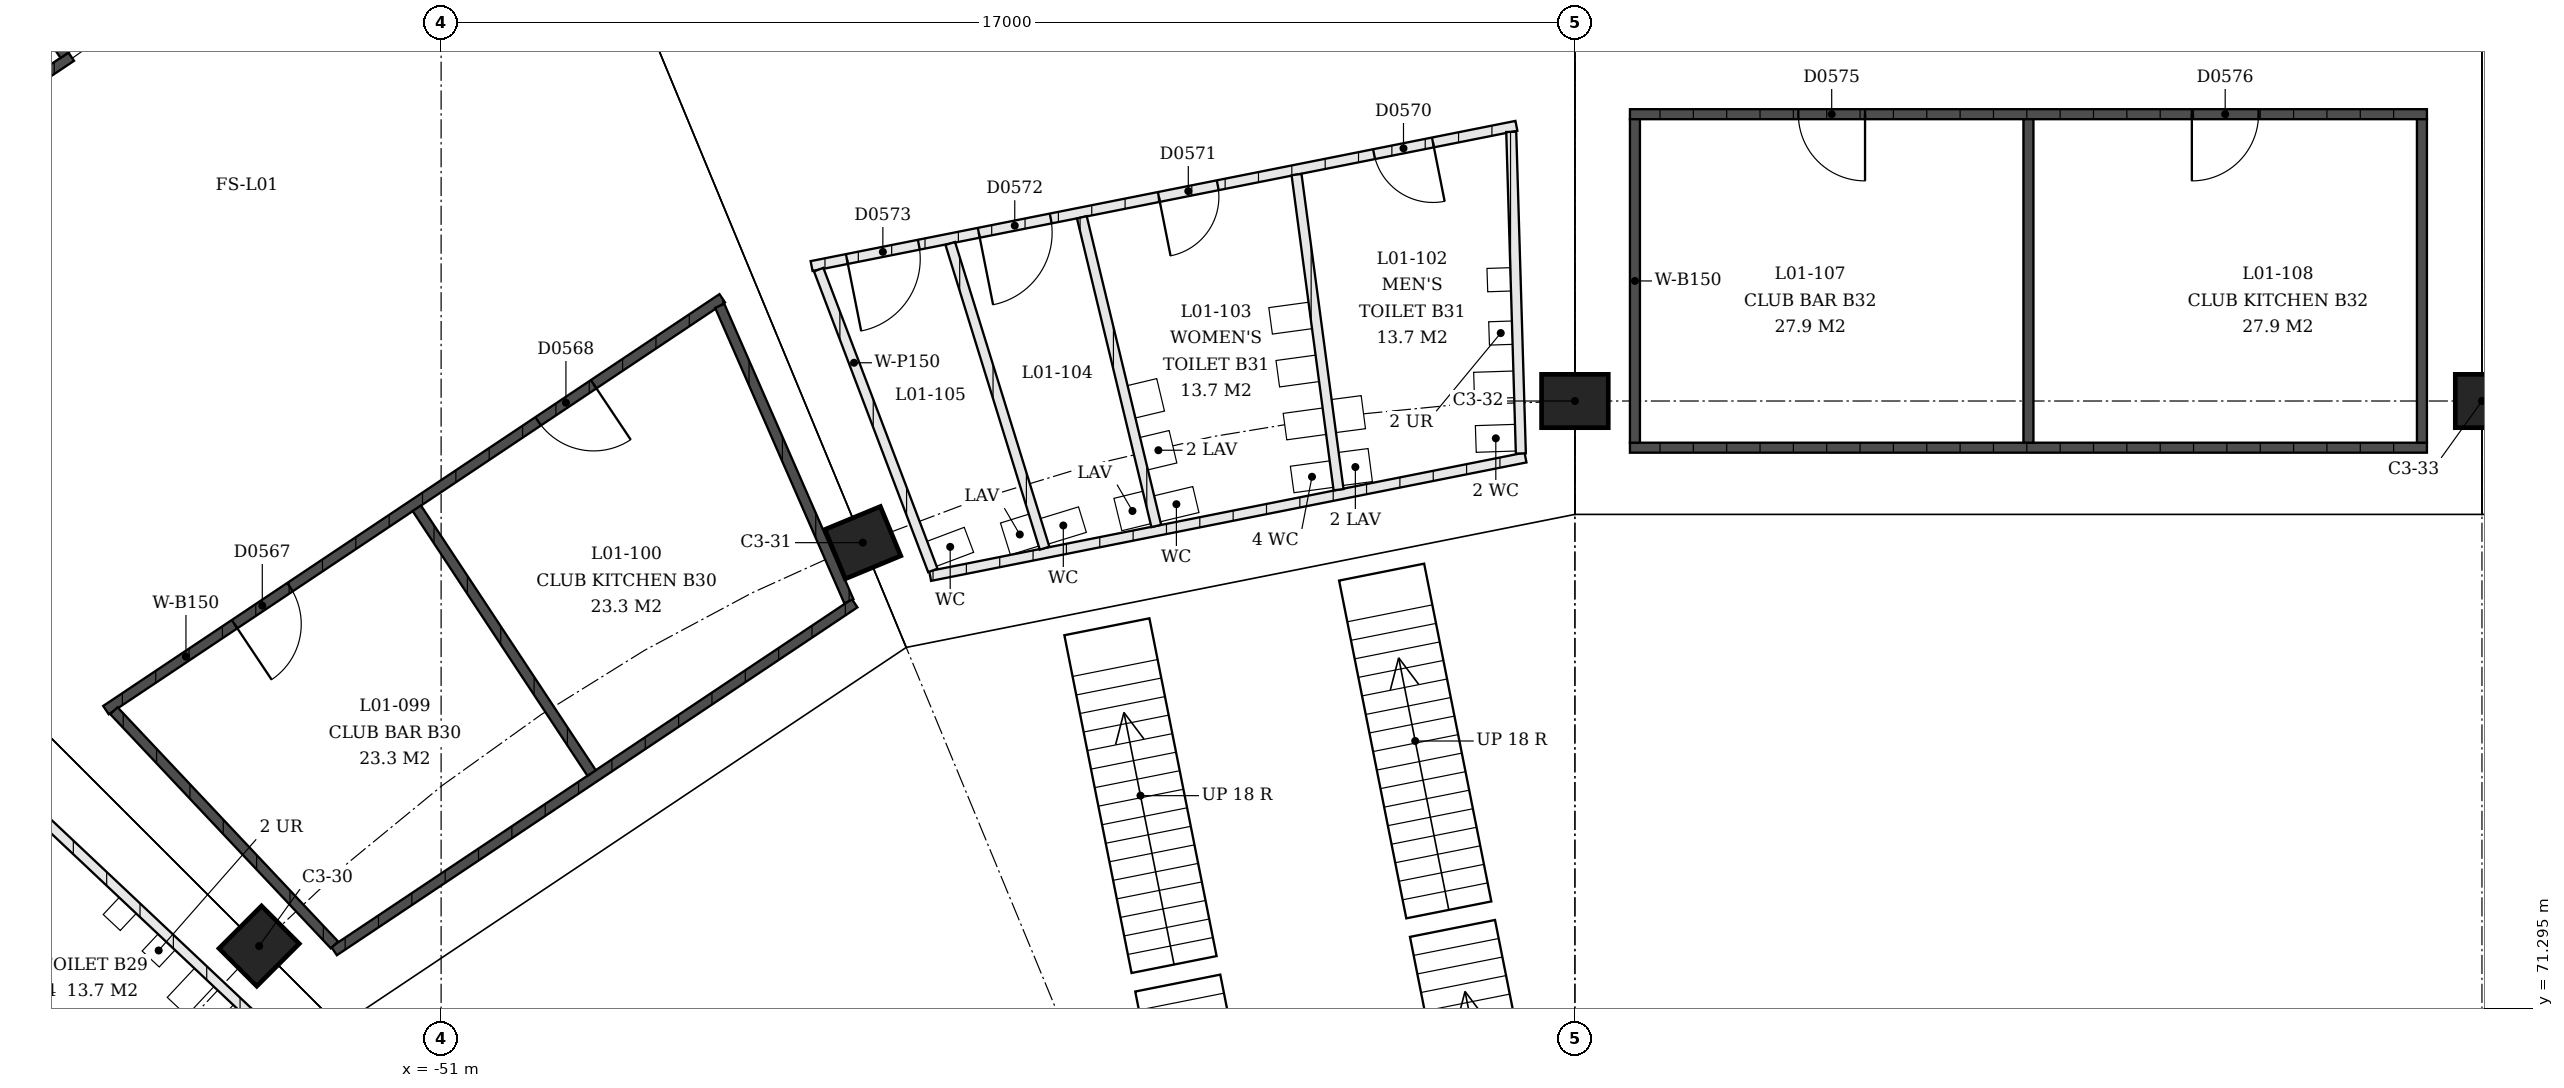
"""IFC4 building model, lengths in metres.
Left out: names, types, materials, properties, quantities, classifications, styles, units other than length and angle.
Written with IfcOpenShell. Run it as: python <this file> out.ifc"""

import sys

from ifc_helpers import new_model, si_unit, direction, frame, frame_2d, origin, origin_2d, place, context, subcontext, project, spatial, rectangle, extrude, element, fill, save


model = new_model("IFC4")
c1 = context("Model", 3, precision=1e-05, world=origin(), true_north=direction((0.0, 1.0)))
c2 = subcontext(c1, "Body", "Model", "MODEL_VIEW")
j1 = project(units=[si_unit("LENGTHUNIT", "METRE"), si_unit("PLANEANGLEUNIT", "RADIAN")], contexts=[c1])
p1 = place(None, origin())
s1 = spatial("IfcSite", under=j1, at=p1, CompositionType="ELEMENT")
p2 = place(p1, origin())
s2 = spatial("IfcBuilding", under=s1, at=p2, CompositionType="ELEMENT")
p3 = place(p2, frame((0.0, 0.0, 4.5)))
s3 = spatial("IfcBuildingStorey", under=s2, at=p3, CompositionType="ELEMENT", Elevation=4.5)
for number, where, z_axis, x_axis in (
    (1, (-53.728, 72.228, 0.0), (0.0, 0.0, 1.0), (-0.707, -0.707, 0.0)),
    (2, (-44.677, 78.276, 0.0), (0.0, 0.0, 1.0), (-0.924, -0.383, 0.0)),
):
    element("IfcColumn", number, at=place(p3, frame(where, z_axis=z_axis, x_axis=x_axis)), inside=s3, PredefinedType="COLUMN", context=c2, shape_type="SweptSolid", body=[
        extrude(rectangle(XDim=0.9, YDim=0.8, at=origin_2d()), origin(), (0.0, 0.0, 1.0), 4.5),
    ])
p4 = place(p3, frame((-34.0, 80.4, 0.0), z_axis=(0.0, 0.0, 1.0), x_axis=(-1.0, 0.0, 0.0)))
e3 = element("IfcColumn", 3, at=p4, inside=s3, PredefinedType="COLUMN", context=c2, shape_type="SweptSolid", body=[
    extrude(rectangle(XDim=1.0, YDim=0.8, at=origin_2d()), origin(), (0.0, 0.0, 1.0), 4.5),
])
p5 = place(p3, frame((-20.4, 80.4, 0.0), z_axis=(0.0, 0.0, 1.0), x_axis=(-1.0, 0.0, 0.0)))
e4 = element("IfcColumn", 4, at=p5, inside=s3, PredefinedType="COLUMN", context=c2, shape_type="SweptSolid", body=[
    extrude(rectangle(XDim=0.8, YDim=0.8, at=origin_2d()), origin(), (0.0, 0.0, 1.0), 4.5),
])
p6 = place(p3, frame((-53.746, 71.099, 0.0), z_axis=(0.0, 0.0, 1.0), x_axis=(-0.727898273696, 0.685685134118, 0.0)))
e5 = element("IfcWall", 5, at=p6, inside=s3, PredefinedType="PARTITIONING", context=c2, shape_type="SweptSolid", body=[
    extrude(rectangle(XDim=4.823, YDim=0.15, at=frame_2d((2.412, 0.0))), origin(), (0.0, 0.0, 1.0), 3.0),
])
p7 = place(p3, frame((-55.294, 68.782, 0.0), z_axis=(0.0, 0.0, 1.0), x_axis=(-0.794378186515, 0.607423490482, 0.0)))
e6 = element("IfcWall", 6, at=p7, inside=s3, PredefinedType="PARTITIONING", context=c2, shape_type="SweptSolid", body=[
    extrude(rectangle(XDim=4.766, YDim=0.15, at=frame_2d((2.383, 0.0))), origin(), (0.0, 0.0, 1.0), 3.0),
])
p8 = place(p3, frame((-52.605, 72.153, 0.0), z_axis=(0.0, 0.0, 1.0), x_axis=(0.831461674059, 0.555582113257, 0.0)))
e7 = element("IfcWall", 7, at=p8, inside=s3, PredefinedType="SOLIDWALL", context=c2, shape_type="SweptSolid", body=[
    extrude(rectangle(XDim=9.388, YDim=0.15, at=frame_2d((4.694, 0.0))), origin(), (0.0, 0.0, 1.0), 3.0),
])
p9 = place(p3, frame((-56.025, 75.766, 0.0), z_axis=(0.0, 0.0, 1.0), x_axis=(0.831478677095, 0.55555666636, 0.0)))
e8 = element("IfcWall", 8, at=p9, inside=s3, PredefinedType="SOLIDWALL", context=c2, shape_type="SweptSolid", body=[
    extrude(rectangle(XDim=11.113, YDim=0.15, at=frame_2d((5.557, 0.0))), origin(), (0.0, 0.0, 1.0), 3.0),
])
p10 = place(p9, frame((2.319, 0.0, 0.0)))
e9 = element("IfcOpeningElement", 9, at=p10, cuts=e8, PredefinedType="OPENING", context=c2, shape_type="SweptSolid", body=[
    extrude(rectangle(XDim=1.0, YDim=2.1, at=frame_2d((0.5, 1.05))), frame((0.0, 0.075, 0.0), z_axis=(0.0, -1.0, 0.0), x_axis=(1.0, 0.0, 0.0)), (0.0, 0.0, 1.0), 0.15),
])
p11 = place(p9, frame((7.794, 0.0, 0.0)))
e10 = element("IfcOpeningElement", 10, at=p11, cuts=e8, PredefinedType="OPENING", context=c2, shape_type="SweptSolid", body=[
    extrude(rectangle(XDim=1.0, YDim=2.1, at=frame_2d((0.5, 1.05))), frame((0.0, 0.075, 0.0), z_axis=(0.0, -1.0, 0.0), x_axis=(1.0, 0.0, 0.0)), (0.0, 0.0, 1.0), 0.15),
])
p12 = place(p3, frame((-52.599, 72.246, 0.0), z_axis=(0.0, 0.0, 1.0), x_axis=(-0.685685134118, 0.727898273696, 0.0)))
e11 = element("IfcWall", 11, at=p12, inside=s3, PredefinedType="SOLIDWALL", context=c2, shape_type="SweptSolid", body=[
    extrude(rectangle(XDim=4.823, YDim=0.15, at=frame_2d((2.412, 0.0))), origin(), (0.0, 0.0, 1.0), 3.0),
])
p13 = place(p3, frame((-48.743, 74.822, 0.0), z_axis=(0.0, 0.0, 1.0), x_axis=(-0.551118175735, 0.834427202561, 0.0)))
e12 = element("IfcWall", 12, at=p13, inside=s3, PredefinedType="SOLIDWALL", context=c2, shape_type="SweptSolid", body=[
    extrude(rectangle(XDim=4.757, YDim=0.15, at=frame_2d((2.378, 0.0))), origin(), (0.0, 0.0, 1.0), 3.0),
])
p14 = place(p3, frame((-44.886, 77.399, 0.0), z_axis=(0.0, 0.0, 1.0), x_axis=(-0.400646552146, 0.916232688924, 0.0)))
e13 = element("IfcWall", 13, at=p14, inside=s3, PredefinedType="SOLIDWALL", context=c2, shape_type="SweptSolid", body=[
    extrude(rectangle(XDim=4.832, YDim=0.15, at=frame_2d((2.416, 0.0))), origin(), (0.0, 0.0, 1.0), 3.0),
])
p15 = place(p3, frame((-58.275, 84.407, 0.0), z_axis=(0.0, 0.0, 1.0), x_axis=(0.831526298134, 0.555485387307, 0.0)))
e14 = element("IfcWall", 14, at=p15, inside=s3, PredefinedType="SOLIDWALL", context=c2, shape_type="SweptSolid", body=[
    extrude(rectangle(XDim=2.08, YDim=0.15, at=frame_2d((1.04, 0.0))), origin(), (0.0, 0.0, 1.0), 3.0),
])
p16 = place(p15, frame((0.472, 0.0, 0.0)))
e15 = element("IfcOpeningElement", 15, at=p16, cuts=e14, PredefinedType="OPENING", context=c2, shape_type="SweptSolid", body=[
    extrude(rectangle(XDim=1.0, YDim=2.1, at=frame_2d((0.5, 1.05))), frame((0.0, 0.075, 0.0), z_axis=(0.0, -1.0, 0.0), x_axis=(1.0, 0.0, 0.0)), (0.0, 0.0, 1.0), 0.15),
])
p17 = place(p3, frame((-56.644, 85.585, 0.0), z_axis=(0.0, 0.0, 1.0), x_axis=(-0.564785434986, 0.825237791444, 0.0)))
e16 = element("IfcWall", 16, at=p17, inside=s3, PredefinedType="SOLIDWALL", context=c2, shape_type="SweptSolid", body=[
    extrude(rectangle(XDim=8.19, YDim=0.15, at=frame_2d((4.095, 0.0))), origin(), (0.0, 0.0, 1.0), 3.0),
])
p18 = place(p3, frame((-34.741, 79.552, 0.0), z_axis=(0.0, 0.0, 1.0), x_axis=(-0.980786464492, -0.195084369103, 0.0)))
e17 = element("IfcWall", 17, at=p18, inside=s3, PredefinedType="PARTITIONING", context=c2, shape_type="SweptSolid", body=[
    extrude(rectangle(XDim=9.102, YDim=0.15, at=frame_2d((4.551, 0.0))), origin(), (0.0, 0.0, 1.0), 3.0),
])
p19 = place(p3, frame((-34.877, 84.525, 0.0), z_axis=(0.0, 0.0, 1.0), x_axis=(-0.98078580384, -0.195087690502, 0.0)))
e18 = element("IfcWall", 18, at=p19, inside=s3, PredefinedType="PARTITIONING", context=c2, shape_type="SweptSolid", body=[
    extrude(rectangle(XDim=10.775, YDim=0.15, at=frame_2d((5.387, 0.0))), origin(), (0.0, 0.0, 1.0), 3.0),
])
p20 = place(p19, frame((1.276, 0.0, 0.0)))
e19 = element("IfcOpeningElement", 19, at=p20, cuts=e18, PredefinedType="OPENING", context=c2, shape_type="SweptSolid", body=[
    extrude(rectangle(XDim=0.9, YDim=2.1, at=frame_2d((0.45, 1.05))), frame((0.0, 0.075, 0.0), z_axis=(0.0, -1.0, 0.0), x_axis=(1.0, 0.0, 0.0)), (0.0, 0.0, 1.0), 0.15),
])
p21 = place(p19, frame((4.566, 0.0, 0.0)))
e20 = element("IfcOpeningElement", 20, at=p21, cuts=e18, PredefinedType="OPENING", context=c2, shape_type="SweptSolid", body=[
    extrude(rectangle(XDim=0.9, YDim=2.1, at=frame_2d((0.45, 1.05))), frame((0.0, 0.075, 0.0), z_axis=(0.0, -1.0, 0.0), x_axis=(1.0, 0.0, 0.0)), (0.0, 0.0, 1.0), 0.15),
])
p22 = place(p19, frame((7.119, 0.0, 0.0)))
e21 = element("IfcOpeningElement", 21, at=p22, cuts=e18, PredefinedType="OPENING", context=c2, shape_type="SweptSolid", body=[
    extrude(rectangle(XDim=1.1, YDim=2.1, at=frame_2d((0.55, 1.05))), frame((0.0, 0.075, 0.0), z_axis=(0.0, -1.0, 0.0), x_axis=(1.0, 0.0, 0.0)), (0.0, 0.0, 1.0), 0.15),
])
p23 = place(p19, frame((9.135, 0.0, 0.0)))
e22 = element("IfcOpeningElement", 22, at=p23, cuts=e18, PredefinedType="OPENING", context=c2, shape_type="SweptSolid", body=[
    extrude(rectangle(XDim=1.1, YDim=2.1, at=frame_2d((0.55, 1.05))), frame((0.0, 0.075, 0.0), z_axis=(0.0, -1.0, 0.0), x_axis=(1.0, 0.0, 0.0)), (0.0, 0.0, 1.0), 0.15),
])
p24 = place(p3, frame((-34.811, 79.614, 0.0), z_axis=(0.0, 0.0, 1.0), x_axis=(-0.02991368842, 0.999552485488, 0.0)))
e23 = element("IfcWall", 23, at=p24, inside=s3, PredefinedType="PARTITIONING", context=c2, shape_type="SweptSolid", body=[
    extrude(rectangle(XDim=4.823, YDim=0.15, at=frame_2d((2.412, 0.0))), origin(), (0.0, 0.0, 1.0), 3.0),
])
p25 = place(p3, frame((-37.544, 79.07, 0.0), z_axis=(0.0, 0.0, 1.0), x_axis=(-0.132200625744, 0.99122297923, 0.0)))
e24 = element("IfcWall", 24, at=p25, inside=s3, PredefinedType="PARTITIONING", context=c2, shape_type="SweptSolid", body=[
    extrude(rectangle(XDim=4.766, YDim=0.15, at=frame_2d((2.383, 0.0))), origin(), (0.0, 0.0, 1.0), 3.0),
])
p26 = place(p3, frame((-40.277, 78.526, 0.0), z_axis=(0.0, 0.0, 1.0), x_axis=(-0.234455054274, 0.9721269606, 0.0)))
e25 = element("IfcWall", 25, at=p26, inside=s3, PredefinedType="PARTITIONING", context=c2, shape_type="SweptSolid", body=[
    extrude(rectangle(XDim=4.761, YDim=0.15, at=frame_2d((2.38, 0.0))), origin(), (0.0, 0.0, 1.0), 3.0),
])
p27 = place(p3, frame((-41.952, 78.193, 0.0), z_axis=(0.0, 0.0, 1.0), x_axis=(-0.295678182088, 0.955287607288, 0.0)))
e26 = element("IfcWall", 26, at=p27, inside=s3, PredefinedType="PARTITIONING", context=c2, shape_type="SweptSolid", body=[
    extrude(rectangle(XDim=4.782, YDim=0.15, at=frame_2d((2.391, 0.0))), origin(), (0.0, 0.0, 1.0), 3.0),
])
p28 = place(p3, frame((-43.627, 77.86, 0.0), z_axis=(0.0, 0.0, 1.0), x_axis=(-0.354909029819, 0.934900839957, 0.0)))
e27 = element("IfcWall", 27, at=p28, inside=s3, PredefinedType="PARTITIONING", context=c2, shape_type="SweptSolid", body=[
    extrude(rectangle(XDim=4.823, YDim=0.15, at=frame_2d((2.412, 0.0))), origin(), (0.0, 0.0, 1.0), 3.0),
])
p29 = place(p3, frame((-33.175, 79.7, 0.0), z_axis=(0.0, 0.0, 1.0), x_axis=(1.0, 0.0, 0.0)))
e28 = element("IfcWall", 28, at=p29, inside=s3, PredefinedType="SOLIDWALL", context=c2, shape_type="SweptSolid", body=[
    extrude(rectangle(XDim=11.95, YDim=0.15, at=frame_2d((5.975, 0.0))), origin(), (0.0, 0.0, 1.0), 3.0),
])
p30 = place(p3, frame((-33.175, 84.7, 0.0), z_axis=(0.0, 0.0, 1.0), x_axis=(1.0, 0.0, 0.0)))
e29 = element("IfcWall", 29, at=p30, inside=s3, PredefinedType="SOLIDWALL", context=c2, shape_type="SweptSolid", body=[
    extrude(rectangle(XDim=11.95, YDim=0.15, at=frame_2d((5.975, 0.0))), origin(), (0.0, 0.0, 1.0), 3.0),
])
p31 = place(p30, frame((2.525, 0.0, 0.0)))
e30 = element("IfcOpeningElement", 30, at=p31, cuts=e29, PredefinedType="OPENING", context=c2, shape_type="SweptSolid", body=[
    extrude(rectangle(XDim=1.0, YDim=2.1, at=frame_2d((0.5, 1.05))), frame((0.0, 0.075, 0.0), z_axis=(0.0, -1.0, 0.0), x_axis=(1.0, 0.0, 0.0)), (0.0, 0.0, 1.0), 0.15),
])
p32 = place(p30, frame((8.425, 0.0, 0.0)))
e31 = element("IfcOpeningElement", 31, at=p32, cuts=e29, PredefinedType="OPENING", context=c2, shape_type="SweptSolid", body=[
    extrude(rectangle(XDim=1.0, YDim=2.1, at=frame_2d((0.5, 1.05))), frame((0.0, 0.075, 0.0), z_axis=(0.0, -1.0, 0.0), x_axis=(1.0, 0.0, 0.0)), (0.0, 0.0, 1.0), 0.15),
])
for number, where, z_axis, x_axis in (
    (32, (-33.1, 79.775, 0.0), (0.0, 0.0, 1.0), (0.0, 1.0, 0.0)),
    (33, (-27.2, 79.775, 0.0), (0.0, 0.0, 1.0), (0.0, 1.0, 0.0)),
    (34, (-21.3, 79.775, 0.0), (0.0, 0.0, 1.0), (0.0, 1.0, 0.0)),
):
    element("IfcWall", number, at=place(p3, frame(where, z_axis=z_axis, x_axis=x_axis)), inside=s3, PredefinedType="SOLIDWALL", context=c2, shape_type="SweptSolid", body=[
        extrude(rectangle(XDim=4.85, YDim=0.15, at=frame_2d((2.425, 0.0))), origin(), (0.0, 0.0, 1.0), 3.0),
    ])
p33 = place(p10, origin())
e35 = element("IfcDoor", 35, at=p33, inside=s3, OperationType="SINGLE_SWING_LEFT", PredefinedType="DOOR", context=c2, shape_type="SweptSolid", body=[
    extrude(rectangle(XDim=1.0, YDim=2.1, at=frame_2d((0.5, 1.05))), frame((0.0, 0.025, 0.0), z_axis=(0.0, -1.0, 0.0), x_axis=(1.0, 0.0, 0.0)), (0.0, 0.0, 1.0), 0.05),
])
fill(e9, e35)
p34 = place(p11, origin())
e36 = element("IfcDoor", 36, at=p34, inside=s3, OperationType="SINGLE_SWING_RIGHT", PredefinedType="DOOR", context=c2, shape_type="SweptSolid", body=[
    extrude(rectangle(XDim=1.0, YDim=2.1, at=frame_2d((0.5, 1.05))), frame((0.0, 0.025, 0.0), z_axis=(0.0, -1.0, 0.0), x_axis=(1.0, 0.0, 0.0)), (0.0, 0.0, 1.0), 0.05),
])
fill(e10, e36)
p35 = place(p20, origin())
e37 = element("IfcDoor", 37, at=p35, inside=s3, OperationType="SINGLE_SWING_RIGHT", PredefinedType="DOOR", context=c2, shape_type="SweptSolid", body=[
    extrude(rectangle(XDim=0.9, YDim=2.1, at=frame_2d((0.45, 1.05))), frame((0.0, 0.025, 0.0), z_axis=(0.0, -1.0, 0.0), x_axis=(1.0, 0.0, 0.0)), (0.0, 0.0, 1.0), 0.05),
])
fill(e19, e37)
p36 = place(p21, origin())
e38 = element("IfcDoor", 38, at=p36, inside=s3, OperationType="SINGLE_SWING_LEFT", PredefinedType="DOOR", context=c2, shape_type="SweptSolid", body=[
    extrude(rectangle(XDim=0.9, YDim=2.1, at=frame_2d((0.45, 1.05))), frame((0.0, 0.025, 0.0), z_axis=(0.0, -1.0, 0.0), x_axis=(1.0, 0.0, 0.0)), (0.0, 0.0, 1.0), 0.05),
])
fill(e20, e38)
p37 = place(p22, origin())
e39 = element("IfcDoor", 39, at=p37, inside=s3, OperationType="SINGLE_SWING_LEFT", PredefinedType="DOOR", context=c2, shape_type="SweptSolid", body=[
    extrude(rectangle(XDim=1.1, YDim=2.1, at=frame_2d((0.55, 1.05))), frame((0.0, 0.025, 0.0), z_axis=(0.0, -1.0, 0.0), x_axis=(1.0, 0.0, 0.0)), (0.0, 0.0, 1.0), 0.05),
])
fill(e21, e39)
p38 = place(p23, origin())
e40 = element("IfcDoor", 40, at=p38, inside=s3, OperationType="SINGLE_SWING_LEFT", PredefinedType="DOOR", context=c2, shape_type="SweptSolid", body=[
    extrude(rectangle(XDim=1.1, YDim=2.1, at=frame_2d((0.55, 1.05))), frame((0.0, 0.025, 0.0), z_axis=(0.0, -1.0, 0.0), x_axis=(1.0, 0.0, 0.0)), (0.0, 0.0, 1.0), 0.05),
])
fill(e22, e40)
p39 = place(p31, origin())
e41 = element("IfcDoor", 41, at=p39, inside=s3, OperationType="SINGLE_SWING_RIGHT", PredefinedType="DOOR", context=c2, shape_type="SweptSolid", body=[
    extrude(rectangle(XDim=1.0, YDim=2.1, at=frame_2d((0.5, 1.05))), frame((0.0, 0.025, 0.0), z_axis=(0.0, -1.0, 0.0), x_axis=(1.0, 0.0, 0.0)), (0.0, 0.0, 1.0), 0.05),
])
fill(e30, e41)
p40 = place(p32, origin())
e42 = element("IfcDoor", 42, at=p40, inside=s3, OperationType="SINGLE_SWING_LEFT", PredefinedType="DOOR", context=c2, shape_type="SweptSolid", body=[
    extrude(rectangle(XDim=1.0, YDim=2.1, at=frame_2d((0.5, 1.05))), frame((0.0, 0.025, 0.0), z_axis=(0.0, -1.0, 0.0), x_axis=(1.0, 0.0, 0.0)), (0.0, 0.0, 1.0), 0.05),
])
fill(e31, e42)
save(model, sys.argv[1])
